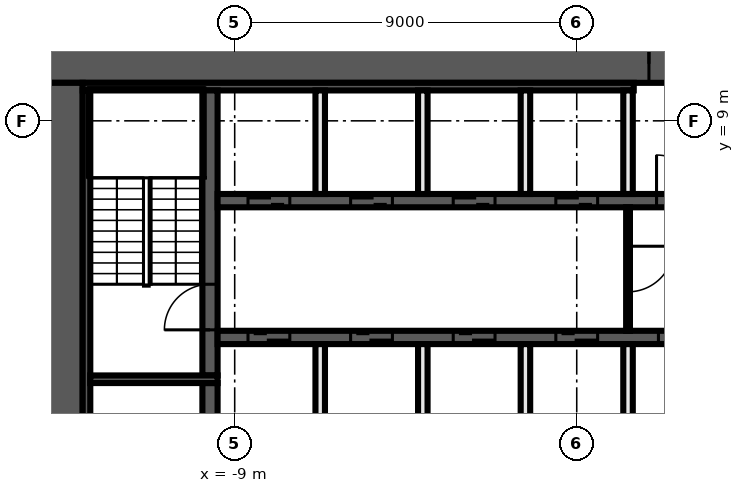
"""IFC4 building model, lengths in metres.
Left out: names, types, materials, properties, quantities, classifications, styles, units other than length and angle.
Written with IfcOpenShell. Run it as: python <this file> out.ifc"""

import sys

from ifc_helpers import new_model, si_unit, direction, frame, frame_2d, origin, place, context, subcontext, project, spatial, rectangle, extrude, element, fill, save


model = new_model("IFC4")
c1 = context("Model", 3, precision=1e-05, world=origin(), true_north=direction((0.0, 1.0)))
c2 = subcontext(c1, "Body", "Model", "MODEL_VIEW")
j1 = project(units=[si_unit("LENGTHUNIT", "METRE"), si_unit("PLANEANGLEUNIT", "RADIAN")], contexts=[c1])
p1 = place(None, origin())
s1 = spatial("IfcSite", under=j1, at=p1, CompositionType="ELEMENT")
p2 = place(p1, origin())
s2 = spatial("IfcBuilding", under=s1, at=p2, CompositionType="ELEMENT")
p3 = place(p2, frame((0.0, 0.0, 124.8)))
s3 = spatial("IfcBuildingStorey", under=s2, at=p3, CompositionType="ELEMENT", Elevation=124.8)
p4 = place(p3, frame((-14.0, 10.5, 0.0), z_axis=(0.0, 0.0, 1.0), x_axis=(1.0, 0.0, 0.0)))
e1 = element("IfcWall", 1, at=p4, inside=s3, PredefinedType="SHEAR", context=c2, shape_type="SweptSolid", body=[
    extrude(rectangle(XDim=28.0, YDim=1.0, at=frame_2d((14.0, 0.0))), origin(), (0.0, 0.0, 1.0), 3.3),
])
p5 = place(p4, frame((15.9, 0.0, 0.0)))
e2 = element("IfcOpeningElement", 2, at=p5, cuts=e1, PredefinedType="OPENING", context=c2, shape_type="SweptSolid", body=[
    extrude(rectangle(XDim=1.6, YDim=2.1, at=frame_2d((0.8, 1.05))), frame((0.0, 0.51, 0.0), z_axis=(0.0, -1.0, 0.0), x_axis=(1.0, 0.0, 0.0)), (0.0, 0.0, 1.0), 1.02),
])
p6 = place(p3, frame((-13.5, -10.0, 0.0), z_axis=(0.0, 0.0, 1.0), x_axis=(0.0, 1.0, 0.0)))
e3 = element("IfcWall", 3, at=p6, inside=s3, PredefinedType="SHEAR", context=c2, shape_type="SweptSolid", body=[
    extrude(rectangle(XDim=20.0, YDim=1.0, at=frame_2d((10.0, 0.0))), origin(), (0.0, 0.0, 1.0), 3.3),
])
p7 = place(p3, frame((-13.0, 9.9, 0.0), z_axis=(0.0, 0.0, 1.0), x_axis=(1.0, 0.0, 0.0)))
e4 = element("IfcWall", 4, at=p7, inside=s3, PredefinedType="SHEAR", context=c2, shape_type="SweptSolid", body=[
    extrude(rectangle(XDim=14.5, YDim=0.2, at=frame_2d((7.25, 0.0))), origin(), (0.0, 0.0, 1.0), 3.3),
])
p8 = place(p3, frame((-12.9, -9.8, 0.0), z_axis=(0.0, 0.0, 1.0), x_axis=(0.0, 1.0, 0.0)))
e5 = element("IfcWall", 5, at=p8, inside=s3, PredefinedType="SHEAR", context=c2, shape_type="SweptSolid", body=[
    extrude(rectangle(XDim=19.6, YDim=0.2, at=frame_2d((9.8, 0.0))), origin(), (0.0, 0.0, 1.0), 3.3),
])
p9 = place(p3, frame((-9.65, -2.1, 0.0), z_axis=(0.0, 0.0, 1.0), x_axis=(0.0, 1.0, 0.0)))
e6 = element("IfcWall", 6, at=p9, inside=s3, PredefinedType="SHEAR", context=c2, shape_type="SweptSolid", body=[
    extrude(rectangle(XDim=4.2, YDim=0.4, at=frame_2d((2.1, 0.0))), origin(), (0.0, 0.0, 1.0), 3.3),
])
p10 = place(p3, frame((-9.65, 2.3, 0.0), z_axis=(0.0, 0.0, 1.0), x_axis=(0.0, 1.0, 0.0)))
e7 = element("IfcWall", 7, at=p10, inside=s3, PredefinedType="SHEAR", context=c2, shape_type="SweptSolid", body=[
    extrude(rectangle(XDim=7.5, YDim=0.4, at=frame_2d((3.75, 0.0))), origin(), (0.0, 0.0, 1.0), 3.3),
])
p11 = place(p10, frame((1.2, 0.0, 0.0)))
e8 = element("IfcOpeningElement", 8, at=p11, cuts=e7, PredefinedType="OPENING", context=c2, shape_type="SweptSolid", body=[
    extrude(rectangle(XDim=1.2, YDim=2.1, at=frame_2d((0.6, 1.05))), frame((0.0, 0.21, 0.0), z_axis=(0.0, -1.0, 0.0), x_axis=(1.0, 0.0, 0.0)), (0.0, 0.0, 1.0), 0.42),
])
p12 = place(p3, frame((-9.45, 2.2, 0.0), z_axis=(0.0, 0.0, 1.0), x_axis=(-1.0, 0.0, 0.0)))
e9 = element("IfcWall", 9, at=p12, inside=s3, PredefinedType="SHEAR", context=c2, shape_type="SweptSolid", body=[
    extrude(rectangle(XDim=3.35, YDim=0.2, at=frame_2d((1.675, 0.0))), origin(), (0.0, 0.0, 1.0), 3.3),
])
p13 = place(p3, frame((-9.45, 6.9, 0.0), z_axis=(0.0, 0.0, 1.0), x_axis=(1.0, 0.0, 0.0)))
e10 = element("IfcWall", 10, at=p13, inside=s3, PredefinedType="SHEAR", context=c2, shape_type="SweptSolid", body=[
    extrude(rectangle(XDim=18.9, YDim=0.35, at=frame_2d((9.45, 0.0))), origin(), (0.0, 0.0, 1.0), 3.3),
])
p14 = place(p13, frame((0.8, 0.0, 0.0)))
e11 = element("IfcOpeningElement", 11, at=p14, cuts=e10, PredefinedType="OPENING", context=c2, shape_type="SweptSolid", body=[
    extrude(rectangle(XDim=1.1, YDim=2.1, at=frame_2d((0.55, 1.05))), frame((0.0, 0.185, 0.0), z_axis=(0.0, -1.0, 0.0), x_axis=(1.0, 0.0, 0.0)), (0.0, 0.0, 1.0), 0.37),
])
p15 = place(p13, frame((3.5, 0.0, 0.0)))
e12 = element("IfcOpeningElement", 12, at=p15, cuts=e10, PredefinedType="OPENING", context=c2, shape_type="SweptSolid", body=[
    extrude(rectangle(XDim=1.1, YDim=2.1, at=frame_2d((0.55, 1.05))), frame((0.0, 0.185, 0.0), z_axis=(0.0, -1.0, 0.0), x_axis=(1.0, 0.0, 0.0)), (0.0, 0.0, 1.0), 0.37),
])
p16 = place(p13, frame((6.2, 0.0, 0.0)))
e13 = element("IfcOpeningElement", 13, at=p16, cuts=e10, PredefinedType="OPENING", context=c2, shape_type="SweptSolid", body=[
    extrude(rectangle(XDim=1.1, YDim=2.1, at=frame_2d((0.55, 1.05))), frame((0.0, 0.185, 0.0), z_axis=(0.0, -1.0, 0.0), x_axis=(1.0, 0.0, 0.0)), (0.0, 0.0, 1.0), 0.37),
])
p17 = place(p13, frame((8.9, 0.0, 0.0)))
e14 = element("IfcOpeningElement", 14, at=p17, cuts=e10, PredefinedType="OPENING", context=c2, shape_type="SweptSolid", body=[
    extrude(rectangle(XDim=1.1, YDim=2.1, at=frame_2d((0.55, 1.05))), frame((0.0, 0.185, 0.0), z_axis=(0.0, -1.0, 0.0), x_axis=(1.0, 0.0, 0.0)), (0.0, 0.0, 1.0), 0.37),
])
p18 = place(p13, frame((11.55, 0.0, 0.0)))
e15 = element("IfcOpeningElement", 15, at=p18, cuts=e10, PredefinedType="OPENING", context=c2, shape_type="SweptSolid", body=[
    extrude(rectangle(XDim=1.2, YDim=2.1, at=frame_2d((0.6, 1.05))), frame((0.0, 0.185, 0.0), z_axis=(0.0, -1.0, 0.0), x_axis=(1.0, 0.0, 0.0)), (0.0, 0.0, 1.0), 0.37),
])
p19 = place(p13, frame((14.3, 0.0, 0.0)))
e16 = element("IfcOpeningElement", 16, at=p19, cuts=e10, PredefinedType="OPENING", context=c2, shape_type="SweptSolid", body=[
    extrude(rectangle(XDim=1.1, YDim=2.1, at=frame_2d((0.55, 1.05))), frame((0.0, 0.185, 0.0), z_axis=(0.0, -1.0, 0.0), x_axis=(1.0, 0.0, 0.0)), (0.0, 0.0, 1.0), 0.37),
])
p20 = place(p13, frame((17.0, 0.0, 0.0)))
e17 = element("IfcOpeningElement", 17, at=p20, cuts=e10, PredefinedType="OPENING", context=c2, shape_type="SweptSolid", body=[
    extrude(rectangle(XDim=1.1, YDim=2.1, at=frame_2d((0.55, 1.05))), frame((0.0, 0.185, 0.0), z_axis=(0.0, -1.0, 0.0), x_axis=(1.0, 0.0, 0.0)), (0.0, 0.0, 1.0), 0.37),
])
p21 = place(p3, frame((9.45, 3.3, 0.0), z_axis=(0.0, 0.0, 1.0), x_axis=(-1.0, 0.0, 0.0)))
e18 = element("IfcWall", 18, at=p21, inside=s3, PredefinedType="SHEAR", context=c2, shape_type="SweptSolid", body=[
    extrude(rectangle(XDim=18.9, YDim=0.35, at=frame_2d((9.45, 0.0))), origin(), (0.0, 0.0, 1.0), 3.3),
])
p22 = place(p21, frame((17.0, 0.0, 0.0)))
e19 = element("IfcOpeningElement", 19, at=p22, cuts=e18, PredefinedType="OPENING", context=c2, shape_type="SweptSolid", body=[
    extrude(rectangle(XDim=1.1, YDim=2.1, at=frame_2d((0.55, 1.05))), frame((0.0, 0.185, 0.0), z_axis=(0.0, -1.0, 0.0), x_axis=(1.0, 0.0, 0.0)), (0.0, 0.0, 1.0), 0.37),
])
p23 = place(p21, frame((14.3, 0.0, 0.0)))
e20 = element("IfcOpeningElement", 20, at=p23, cuts=e18, PredefinedType="OPENING", context=c2, shape_type="SweptSolid", body=[
    extrude(rectangle(XDim=1.1, YDim=2.1, at=frame_2d((0.55, 1.05))), frame((0.0, 0.185, 0.0), z_axis=(0.0, -1.0, 0.0), x_axis=(1.0, 0.0, 0.0)), (0.0, 0.0, 1.0), 0.37),
])
p24 = place(p21, frame((11.6, 0.0, 0.0)))
e21 = element("IfcOpeningElement", 21, at=p24, cuts=e18, PredefinedType="OPENING", context=c2, shape_type="SweptSolid", body=[
    extrude(rectangle(XDim=1.1, YDim=2.1, at=frame_2d((0.55, 1.05))), frame((0.0, 0.185, 0.0), z_axis=(0.0, -1.0, 0.0), x_axis=(1.0, 0.0, 0.0)), (0.0, 0.0, 1.0), 0.37),
])
p25 = place(p21, frame((8.9, 0.0, 0.0)))
e22 = element("IfcOpeningElement", 22, at=p25, cuts=e18, PredefinedType="OPENING", context=c2, shape_type="SweptSolid", body=[
    extrude(rectangle(XDim=1.1, YDim=2.1, at=frame_2d((0.55, 1.05))), frame((0.0, 0.185, 0.0), z_axis=(0.0, -1.0, 0.0), x_axis=(1.0, 0.0, 0.0)), (0.0, 0.0, 1.0), 0.37),
])
p26 = place(p21, frame((6.2, 0.0, 0.0)))
e23 = element("IfcOpeningElement", 23, at=p26, cuts=e18, PredefinedType="OPENING", context=c2, shape_type="SweptSolid", body=[
    extrude(rectangle(XDim=1.1, YDim=2.1, at=frame_2d((0.55, 1.05))), frame((0.0, 0.185, 0.0), z_axis=(0.0, -1.0, 0.0), x_axis=(1.0, 0.0, 0.0)), (0.0, 0.0, 1.0), 0.37),
])
p27 = place(p21, frame((3.5, 0.0, 0.0)))
e24 = element("IfcOpeningElement", 24, at=p27, cuts=e18, PredefinedType="OPENING", context=c2, shape_type="SweptSolid", body=[
    extrude(rectangle(XDim=1.1, YDim=2.1, at=frame_2d((0.55, 1.05))), frame((0.0, 0.185, 0.0), z_axis=(0.0, -1.0, 0.0), x_axis=(1.0, 0.0, 0.0)), (0.0, 0.0, 1.0), 0.37),
])
p28 = place(p21, frame((0.9, 0.0, 0.0)))
e25 = element("IfcOpeningElement", 25, at=p28, cuts=e18, PredefinedType="OPENING", context=c2, shape_type="SweptSolid", body=[
    extrude(rectangle(XDim=0.9, YDim=2.1, at=frame_2d((0.45, 1.05))), frame((0.0, 0.185, 0.0), z_axis=(0.0, -1.0, 0.0), x_axis=(1.0, 0.0, 0.0)), (0.0, 0.0, 1.0), 0.37),
])
p29 = place(p3, frame((1.35, 6.725, 0.0), z_axis=(0.0, 0.0, 1.0), x_axis=(0.0, -1.0, 0.0)))
e26 = element("IfcWall", 26, at=p29, inside=s3, PredefinedType="PARTITIONING", context=c2, shape_type="SweptSolid", body=[
    extrude(rectangle(XDim=3.25, YDim=0.1, at=frame_2d((1.625, 0.0))), origin(), (0.0, 0.0, 1.0), 3.3),
])
p30 = place(p29, frame((1.025, 0.0, 0.0)))
e27 = element("IfcOpeningElement", 27, at=p30, cuts=e26, PredefinedType="OPENING", context=c2, shape_type="SweptSolid", body=[
    extrude(rectangle(XDim=1.2, YDim=2.1, at=frame_2d((0.6, 1.05))), frame((0.0, 0.06, 0.0), z_axis=(0.0, -1.0, 0.0), x_axis=(1.0, 0.0, 0.0)), (0.0, 0.0, 1.0), 0.12),
])
for number, where, z_axis, x_axis in (
    (28, (1.35, 0.4, 0.0), (0.0, 0.0, 1.0), (0.0, 1.0, 0.0)),
    (29, (1.35, 7.075, 0.0), (0.0, 0.0, 1.0), (0.0, 1.0, 0.0)),
    (30, (-1.35, 0.4, 0.0), (0.0, 0.0, 1.0), (0.0, 1.0, 0.0)),
    (31, (-1.35, 7.075, 0.0), (0.0, 0.0, 1.0), (0.0, 1.0, 0.0)),
    (32, (-4.05, 0.4, 0.0), (0.0, 0.0, 1.0), (0.0, 1.0, 0.0)),
    (33, (-4.05, 7.075, 0.0), (0.0, 0.0, 1.0), (0.0, 1.0, 0.0)),
    (34, (-6.75, 0.4, 0.0), (0.0, 0.0, 1.0), (0.0, 1.0, 0.0)),
    (35, (-6.75, 7.075, 0.0), (0.0, 0.0, 1.0), (0.0, 1.0, 0.0)),
):
    element("IfcWall", number, at=place(p3, frame(where, z_axis=z_axis, x_axis=x_axis)), inside=s3, PredefinedType="SOLIDWALL", context=c2, shape_type="SweptSolid", body=[
        extrude(rectangle(XDim=2.725, YDim=0.25, at=frame_2d((1.363, 0.0))), origin(), (0.0, 0.0, 1.0), 3.3),
    ])
p31 = place(p14, origin())
e36 = element("IfcDoor", 36, at=p31, inside=s3, OperationType="DOUBLE_DOOR_SLIDING", PredefinedType="DOOR", context=c2, shape_type="SweptSolid", body=[
    extrude(rectangle(XDim=1.1, YDim=2.1, at=frame_2d((0.55, 1.05))), frame((0.0, 0.025, 0.0), z_axis=(0.0, -1.0, 0.0), x_axis=(1.0, 0.0, 0.0)), (0.0, 0.0, 1.0), 0.05),
])
fill(e11, e36)
p32 = place(p15, origin())
e37 = element("IfcDoor", 37, at=p32, inside=s3, OperationType="DOUBLE_DOOR_SLIDING", PredefinedType="DOOR", context=c2, shape_type="SweptSolid", body=[
    extrude(rectangle(XDim=1.1, YDim=2.1, at=frame_2d((0.55, 1.05))), frame((0.0, 0.025, 0.0), z_axis=(0.0, -1.0, 0.0), x_axis=(1.0, 0.0, 0.0)), (0.0, 0.0, 1.0), 0.05),
])
fill(e12, e37)
p33 = place(p16, origin())
e38 = element("IfcDoor", 38, at=p33, inside=s3, OperationType="DOUBLE_DOOR_SLIDING", PredefinedType="DOOR", context=c2, shape_type="SweptSolid", body=[
    extrude(rectangle(XDim=1.1, YDim=2.1, at=frame_2d((0.55, 1.05))), frame((0.0, 0.025, 0.0), z_axis=(0.0, -1.0, 0.0), x_axis=(1.0, 0.0, 0.0)), (0.0, 0.0, 1.0), 0.05),
])
fill(e13, e38)
p34 = place(p17, origin())
e39 = element("IfcDoor", 39, at=p34, inside=s3, OperationType="DOUBLE_DOOR_SLIDING", PredefinedType="DOOR", context=c2, shape_type="SweptSolid", body=[
    extrude(rectangle(XDim=1.1, YDim=2.1, at=frame_2d((0.55, 1.05))), frame((0.0, 0.025, 0.0), z_axis=(0.0, -1.0, 0.0), x_axis=(1.0, 0.0, 0.0)), (0.0, 0.0, 1.0), 0.05),
])
fill(e14, e39)
p35 = place(p5, origin())
e40 = element("IfcDoor", 40, at=p35, inside=s3, OperationType="DOUBLE_DOOR_SINGLE_SWING", PredefinedType="DOOR", context=c2, shape_type="SweptSolid", body=[
    extrude(rectangle(XDim=1.6, YDim=2.1, at=frame_2d((0.8, 1.05))), frame((0.0, 0.025, 0.0), z_axis=(0.0, -1.0, 0.0), x_axis=(1.0, 0.0, 0.0)), (0.0, 0.0, 1.0), 0.05),
])
fill(e2, e40)
p36 = place(p18, origin())
e41 = element("IfcDoor", 41, at=p36, inside=s3, OperationType="SINGLE_SWING_LEFT", PredefinedType="DOOR", context=c2, shape_type="SweptSolid", body=[
    extrude(rectangle(XDim=1.2, YDim=2.1, at=frame_2d((0.6, 1.05))), frame((0.0, 0.025, 0.0), z_axis=(0.0, -1.0, 0.0), x_axis=(1.0, 0.0, 0.0)), (0.0, 0.0, 1.0), 0.05),
])
fill(e15, e41)
p37 = place(p22, origin())
e42 = element("IfcDoor", 42, at=p37, inside=s3, OperationType="DOUBLE_DOOR_SLIDING", PredefinedType="DOOR", context=c2, shape_type="SweptSolid", body=[
    extrude(rectangle(XDim=1.1, YDim=2.1, at=frame_2d((0.55, 1.05))), frame((0.0, 0.025, 0.0), z_axis=(0.0, -1.0, 0.0), x_axis=(1.0, 0.0, 0.0)), (0.0, 0.0, 1.0), 0.05),
])
fill(e19, e42)
p38 = place(p23, origin())
e43 = element("IfcDoor", 43, at=p38, inside=s3, OperationType="DOUBLE_DOOR_SLIDING", PredefinedType="DOOR", context=c2, shape_type="SweptSolid", body=[
    extrude(rectangle(XDim=1.1, YDim=2.1, at=frame_2d((0.55, 1.05))), frame((0.0, 0.025, 0.0), z_axis=(0.0, -1.0, 0.0), x_axis=(1.0, 0.0, 0.0)), (0.0, 0.0, 1.0), 0.05),
])
fill(e20, e43)
p39 = place(p24, origin())
e44 = element("IfcDoor", 44, at=p39, inside=s3, OperationType="DOUBLE_DOOR_SLIDING", PredefinedType="DOOR", context=c2, shape_type="SweptSolid", body=[
    extrude(rectangle(XDim=1.1, YDim=2.1, at=frame_2d((0.55, 1.05))), frame((0.0, 0.025, 0.0), z_axis=(0.0, -1.0, 0.0), x_axis=(1.0, 0.0, 0.0)), (0.0, 0.0, 1.0), 0.05),
])
fill(e21, e44)
p40 = place(p25, origin())
e45 = element("IfcDoor", 45, at=p40, inside=s3, OperationType="DOUBLE_DOOR_SLIDING", PredefinedType="DOOR", context=c2, shape_type="SweptSolid", body=[
    extrude(rectangle(XDim=1.1, YDim=2.1, at=frame_2d((0.55, 1.05))), frame((0.0, 0.025, 0.0), z_axis=(0.0, -1.0, 0.0), x_axis=(1.0, 0.0, 0.0)), (0.0, 0.0, 1.0), 0.05),
])
fill(e22, e45)
p41 = place(p26, origin())
e46 = element("IfcDoor", 46, at=p41, inside=s3, OperationType="DOUBLE_DOOR_SLIDING", PredefinedType="DOOR", context=c2, shape_type="SweptSolid", body=[
    extrude(rectangle(XDim=1.1, YDim=2.1, at=frame_2d((0.55, 1.05))), frame((0.0, 0.025, 0.0), z_axis=(0.0, -1.0, 0.0), x_axis=(1.0, 0.0, 0.0)), (0.0, 0.0, 1.0), 0.05),
])
fill(e23, e46)
p42 = place(p11, origin())
e47 = element("IfcDoor", 47, at=p42, inside=s3, OperationType="SINGLE_SWING_RIGHT", PredefinedType="DOOR", context=c2, shape_type="SweptSolid", body=[
    extrude(rectangle(XDim=1.2, YDim=2.1, at=frame_2d((0.6, 1.05))), frame((0.0, 0.025, 0.0), z_axis=(0.0, -1.0, 0.0), x_axis=(1.0, 0.0, 0.0)), (0.0, 0.0, 1.0), 0.05),
])
fill(e8, e47)
p43 = place(p30, origin())
e48 = element("IfcDoor", 48, at=p43, inside=s3, OperationType="SINGLE_SWING_LEFT", PredefinedType="DOOR", context=c2, shape_type="SweptSolid", body=[
    extrude(rectangle(XDim=1.2, YDim=2.1, at=frame_2d((0.6, 1.05))), frame((0.0, 0.025, 0.0), z_axis=(0.0, -1.0, 0.0), x_axis=(1.0, 0.0, 0.0)), (0.0, 0.0, 1.0), 0.05),
])
fill(e27, e48)
save(model, sys.argv[1])
